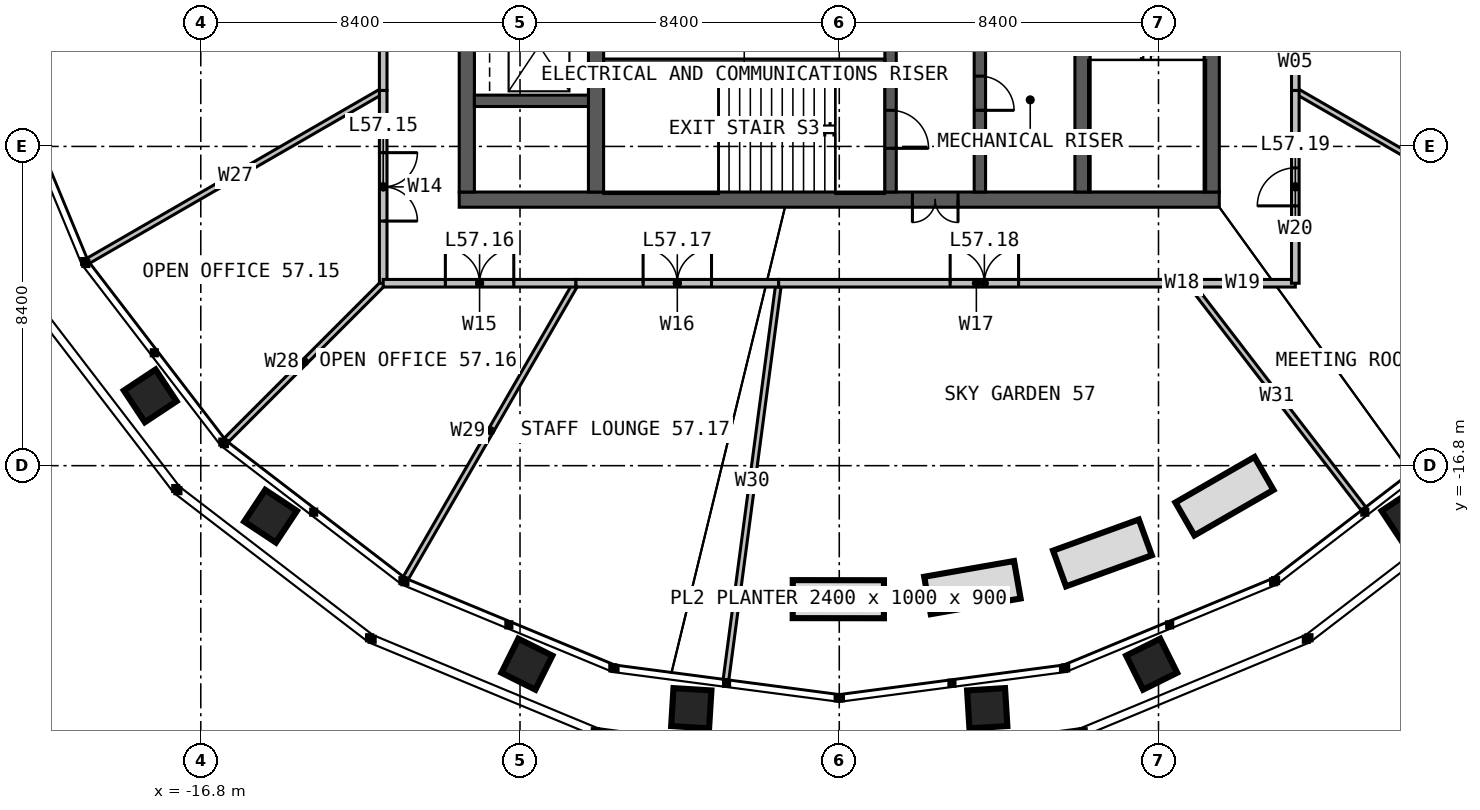
"""IFC4 building model, lengths in metres.
Left out: names, types, materials, properties, quantities, classifications, styles, units other than length and angle.
Written with IfcOpenShell. Run it as: python <this file> out.ifc"""

import sys

from ifc_helpers import new_model, si_unit, direction, frame, frame_2d, origin, place, context, subcontext, project, spatial, rectangle, extrude, element, fill, save


model = new_model("IFC4")
c1 = context("Model", 3, precision=1e-05, world=origin(), true_north=direction((0.0, 1.0)))
c2 = subcontext(c1, "Body", "Model", "MODEL_VIEW")
j1 = project(units=[si_unit("LENGTHUNIT", "METRE"), si_unit("PLANEANGLEUNIT", "RADIAN")], contexts=[c1])
p1 = place(None, origin())
s1 = spatial("IfcSite", under=j1, at=p1, CompositionType="ELEMENT")
p2 = place(p1, origin())
s2 = spatial("IfcBuilding", under=s1, at=p2, CompositionType="ELEMENT")
p3 = place(p2, frame((0.0, 0.0, 236.0)))
s3 = spatial("IfcBuildingStorey", under=s2, at=p3, CompositionType="ELEMENT", Elevation=236.0)
p4 = place(p3, frame((10.0, -9.8, 0.0), z_axis=(0.0, 0.0, 1.0), x_axis=(-1.0, 0.0, 0.0)))
e1 = element("IfcWall", 1, at=p4, inside=s3, PredefinedType="SOLIDWALL", context=c2, shape_type="SweptSolid", body=[
    extrude(rectangle(XDim=20.0, YDim=0.4, at=frame_2d((10.0, 0.0))), origin(), (0.0, 0.0, 1.0), 4.0),
])
p5 = place(p4, frame((6.875, 0.0, 0.0)))
e2 = element("IfcOpeningElement", 2, at=p5, cuts=e1, PredefinedType="OPENING", context=c2, shape_type="SweptSolid", body=[
    extrude(rectangle(XDim=1.2, YDim=2.2, at=frame_2d((0.6, 1.1))), frame((0.0, 0.21, 0.0), z_axis=(0.0, -1.0, 0.0), x_axis=(1.0, 0.0, 0.0)), (0.0, 0.0, 1.0), 0.42),
])
for number, where, z_axis, x_axis in (
    (3, (9.8, -9.6, 0.0), (0.0, 0.0, 1.0), (0.0, 1.0, 0.0)),
    (4, (-9.8, 9.6, 0.0), (0.0, 0.0, 1.0), (0.0, -1.0, 0.0)),
):
    element("IfcWall", number, at=place(p3, frame(where, z_axis=z_axis, x_axis=x_axis)), inside=s3, PredefinedType="SOLIDWALL", context=c2, shape_type="SweptSolid", body=[
        extrude(rectangle(XDim=19.2, YDim=0.4, at=frame_2d((9.6, 0.0))), origin(), (0.0, 0.0, 1.0), 4.0),
    ])
p6 = place(p3, frame((-6.4, -9.6, 0.0), z_axis=(0.0, 0.0, 1.0), x_axis=(0.0, 1.0, 0.0)))
e5 = element("IfcWall", 5, at=p6, inside=s3, PredefinedType="SOLIDWALL", context=c2, shape_type="SweptSolid", body=[
    extrude(rectangle(XDim=19.2, YDim=0.4, at=frame_2d((9.6, 0.0))), origin(), (0.0, 0.0, 1.0), 4.0),
])
p7 = place(p6, frame((9.1, 0.0, 0.0)))
e6 = element("IfcOpeningElement", 6, at=p7, cuts=e5, PredefinedType="OPENING", context=c2, shape_type="SweptSolid", body=[
    extrude(rectangle(XDim=1.0, YDim=2.2, at=frame_2d((0.5, 1.1))), frame((0.0, 0.21, 0.0), z_axis=(0.0, -1.0, 0.0), x_axis=(1.0, 0.0, 0.0)), (0.0, 0.0, 1.0), 0.42),
])
p8 = place(p3, frame((6.4, 9.6, 0.0), z_axis=(0.0, 0.0, 1.0), x_axis=(0.0, -1.0, 0.0)))
e7 = element("IfcWall", 7, at=p8, inside=s3, PredefinedType="SOLIDWALL", context=c2, shape_type="SweptSolid", body=[
    extrude(rectangle(XDim=19.2, YDim=0.4, at=frame_2d((9.6, 0.0))), origin(), (0.0, 0.0, 1.0), 4.0),
])
p9 = place(p8, frame((9.1, 0.0, 0.0)))
e8 = element("IfcOpeningElement", 8, at=p9, cuts=e7, PredefinedType="OPENING", context=c2, shape_type="SweptSolid", body=[
    extrude(rectangle(XDim=1.0, YDim=2.2, at=frame_2d((0.5, 1.1))), frame((0.0, 0.21, 0.0), z_axis=(0.0, -1.0, 0.0), x_axis=(1.0, 0.0, 0.0)), (0.0, 0.0, 1.0), 0.42),
])
p10 = place(p3, frame((1.35, -1.45, 0.0), z_axis=(0.0, 0.0, 1.0), x_axis=(0.0, -1.0, 0.0)))
e9 = element("IfcWall", 9, at=p10, inside=s3, PredefinedType="SOLIDWALL", context=c2, shape_type="SweptSolid", body=[
    extrude(rectangle(XDim=8.15, YDim=0.3, at=frame_2d((4.075, 0.0))), origin(), (0.0, 0.0, 1.0), 4.0),
])
p11 = place(p10, frame((6.0, 0.0, 0.0)))
e10 = element("IfcOpeningElement", 10, at=p11, cuts=e9, PredefinedType="OPENING", context=c2, shape_type="SweptSolid", body=[
    extrude(rectangle(XDim=1.0, YDim=2.2, at=frame_2d((0.5, 1.1))), frame((0.0, 0.16, 0.0), z_axis=(0.0, -1.0, 0.0), x_axis=(1.0, 0.0, 0.0)), (0.0, 0.0, 1.0), 0.32),
])
p12 = place(p10, frame((3.525, 0.0, 0.0)))
e11 = element("IfcOpeningElement", 11, at=p12, cuts=e9, PredefinedType="OPENING", context=c2, shape_type="SweptSolid", body=[
    extrude(rectangle(XDim=0.9, YDim=2.2, at=frame_2d((0.45, 1.1))), frame((0.0, 0.16, 0.0), z_axis=(0.0, -1.0, 0.0), x_axis=(1.0, 0.0, 0.0)), (0.0, 0.0, 1.0), 0.32),
])
p13 = place(p3, frame((3.7, -1.45, 0.0), z_axis=(0.0, 0.0, 1.0), x_axis=(0.0, -1.0, 0.0)))
e12 = element("IfcWall", 12, at=p13, inside=s3, PredefinedType="SOLIDWALL", context=c2, shape_type="SweptSolid", body=[
    extrude(rectangle(XDim=8.15, YDim=0.3, at=frame_2d((4.075, 0.0))), origin(), (0.0, 0.0, 1.0), 4.0),
])
p14 = place(p13, frame((5.1, 0.0, 0.0)))
e13 = element("IfcOpeningElement", 13, at=p14, cuts=e12, PredefinedType="OPENING", context=c2, shape_type="SweptSolid", body=[
    extrude(rectangle(XDim=0.9, YDim=2.2, at=frame_2d((0.45, 1.1))), frame((0.0, 0.16, 0.0), z_axis=(0.0, -1.0, 0.0), x_axis=(1.0, 0.0, 0.0)), (0.0, 0.0, 1.0), 0.32),
])
p15 = place(p3, frame((-6.2, -6.2, 0.0), z_axis=(0.0, 0.0, 1.0), x_axis=(1.0, 0.0, 0.0)))
e14 = element("IfcWall", 14, at=p15, inside=s3, PredefinedType="SOLIDWALL", context=c2, shape_type="SweptSolid", body=[
    extrude(rectangle(XDim=7.4, YDim=0.2, at=frame_2d((3.7, 0.0))), origin(), (0.0, 0.0, 1.0), 4.0),
])
p16 = place(p3, frame((-9.6, -7.2, 0.0), z_axis=(0.0, 0.0, 1.0), x_axis=(1.0, 0.0, 0.0)))
e15 = element("IfcWall", 15, at=p16, inside=s3, PredefinedType="SOLIDWALL", context=c2, shape_type="SweptSolid", body=[
    extrude(rectangle(XDim=3.0, YDim=0.3, at=frame_2d((1.5, 0.0))), origin(), (0.0, 0.0, 1.0), 4.0),
])
p17 = place(p3, frame((12.0, -6.928, 0.0), z_axis=(0.0, 0.0, 1.0), x_axis=(0.866025969295, -0.499999020506, 0.0)))
e16 = element("IfcWall", 16, at=p17, inside=s3, PredefinedType="PARTITIONING", context=c2, shape_type="SweptSolid", body=[
    extrude(rectangle(XDim=8.966, YDim=0.15, at=frame_2d((4.483, 0.0))), origin(), (0.0, 0.0, 1.0), 2.79),
])
p18 = place(p3, frame((12.0, -3.215, 0.0), z_axis=(0.0, 0.0, 1.0), x_axis=(0.965927197493, -0.258813927647, 0.0)))
e17 = element("IfcWall", 17, at=p18, inside=s3, PredefinedType="PARTITIONING", context=c2, shape_type="SweptSolid", body=[
    extrude(rectangle(XDim=10.399, YDim=0.15, at=frame_2d((5.199, 0.0))), origin(), (0.0, 0.0, 1.0), 2.79),
])
p19 = place(p3, frame((-12.0, -6.928, 0.0), z_axis=(0.0, 0.0, 1.0), x_axis=(-0.866025969295, -0.499999020506, 0.0)))
e18 = element("IfcWall", 18, at=p19, inside=s3, PredefinedType="PARTITIONING", context=c2, shape_type="SweptSolid", body=[
    extrude(rectangle(XDim=8.966, YDim=0.15, at=frame_2d((4.483, 0.0))), origin(), (0.0, 0.0, 1.0), 2.79),
])
p20 = place(p3, frame((-12.0, -12.0, 0.0), z_axis=(0.0, 0.0, 1.0), x_axis=(-0.707106781187, -0.707106781187, 0.0)))
e19 = element("IfcWall", 19, at=p20, inside=s3, PredefinedType="PARTITIONING", context=c2, shape_type="SweptSolid", body=[
    extrude(rectangle(XDim=5.852, YDim=0.15, at=frame_2d((2.926, 0.0))), origin(), (0.0, 0.0, 1.0), 2.79),
])
p21 = place(p3, frame((-6.928, -12.0, 0.0), z_axis=(0.0, 0.0, 1.0), x_axis=(-0.499999020506, -0.866025969295, 0.0)))
e20 = element("IfcWall", 20, at=p21, inside=s3, PredefinedType="PARTITIONING", context=c2, shape_type="SweptSolid", body=[
    extrude(rectangle(XDim=8.966, YDim=0.15, at=frame_2d((4.483, 0.0))), origin(), (0.0, 0.0, 1.0), 2.79),
])
p22 = place(p3, frame((-1.594, -12.0, 0.0), z_axis=(0.0, 0.0, 1.0), x_axis=(-0.131727497691, -0.991285965982, 0.0)))
e21 = element("IfcWall", 21, at=p22, inside=s3, PredefinedType="PARTITIONING", context=c2, shape_type="SweptSolid", body=[
    extrude(rectangle(XDim=10.522, YDim=0.15, at=frame_2d((5.261, 0.0))), origin(), (0.0, 0.0, 1.0), 2.79),
])
p23 = place(p3, frame((9.231, -12.0, 0.0), z_axis=(0.0, 0.0, 1.0), x_axis=(0.609721791475, -0.792615503886, 0.0)))
e22 = element("IfcWall", 22, at=p23, inside=s3, PredefinedType="PARTITIONING", context=c2, shape_type="SweptSolid", body=[
    extrude(rectangle(XDim=7.487, YDim=0.15, at=frame_2d((3.744, 0.0))), origin(), (0.0, 0.0, 1.0), 2.79),
])
p24 = place(p3, frame((12.0, -6.928, 0.0), z_axis=(0.0, 0.0, 1.0), x_axis=(0.0, 1.0, 0.0)))
e23 = element("IfcWall", 23, at=p24, inside=s3, PredefinedType="PARTITIONING", context=c2, shape_type="SweptSolid", body=[
    extrude(rectangle(XDim=3.713, YDim=0.2, at=frame_2d((1.856, 0.0))), origin(), (0.0, 0.0, 1.0), 3.8),
])
p25 = place(p24, frame((1.356, 0.0, 0.0)))
e24 = element("IfcOpeningElement", 24, at=p25, cuts=e23, PredefinedType="OPENING", context=c2, shape_type="SweptSolid", body=[
    extrude(rectangle(XDim=1.0, YDim=2.2, at=frame_2d((0.5, 1.1))), frame((0.0, 0.11, 0.0), z_axis=(0.0, -1.0, 0.0), x_axis=(1.0, 0.0, 0.0)), (0.0, 0.0, 1.0), 0.22),
])
p26 = place(p3, frame((-12.0, 6.928, 0.0), z_axis=(0.0, 0.0, 1.0), x_axis=(0.0, -1.0, 0.0)))
e25 = element("IfcWall", 25, at=p26, inside=s3, PredefinedType="PARTITIONING", context=c2, shape_type="SweptSolid", body=[
    extrude(rectangle(XDim=13.856, YDim=0.2, at=frame_2d((6.928, 0.0))), origin(), (0.0, 0.0, 1.0), 3.8),
])
p27 = place(p26, frame((6.028, 0.0, 0.0)))
e26 = element("IfcOpeningElement", 26, at=p27, cuts=e25, PredefinedType="OPENING", context=c2, shape_type="SweptSolid", body=[
    extrude(rectangle(XDim=1.8, YDim=2.2, at=frame_2d((0.9, 1.1))), frame((0.0, 0.11, 0.0), z_axis=(0.0, -1.0, 0.0), x_axis=(1.0, 0.0, 0.0)), (0.0, 0.0, 1.0), 0.22),
])
p28 = place(p3, frame((-12.0, -6.928, 0.0), z_axis=(0.0, 0.0, 1.0), x_axis=(0.0, -1.0, 0.0)))
e27 = element("IfcWall", 27, at=p28, inside=s3, PredefinedType="PARTITIONING", context=c2, shape_type="SweptSolid", body=[
    extrude(rectangle(XDim=5.072, YDim=0.2, at=frame_2d((2.536, 0.0))), origin(), (0.0, 0.0, 1.0), 3.8),
])
p29 = place(p28, frame((1.636, 0.0, 0.0)))
e28 = element("IfcOpeningElement", 28, at=p29, cuts=e27, PredefinedType="OPENING", context=c2, shape_type="SweptSolid", body=[
    extrude(rectangle(XDim=1.8, YDim=2.2, at=frame_2d((0.9, 1.1))), frame((0.0, 0.11, 0.0), z_axis=(0.0, -1.0, 0.0), x_axis=(1.0, 0.0, 0.0)), (0.0, 0.0, 1.0), 0.22),
])
p30 = place(p3, frame((-12.0, -12.0, 0.0), z_axis=(0.0, 0.0, 1.0), x_axis=(1.0, 0.0, 0.0)))
e29 = element("IfcWall", 29, at=p30, inside=s3, PredefinedType="PARTITIONING", context=c2, shape_type="SweptSolid", body=[
    extrude(rectangle(XDim=5.072, YDim=0.2, at=frame_2d((2.536, 0.0))), origin(), (0.0, 0.0, 1.0), 3.8),
])
p31 = place(p30, frame((1.636, 0.0, 0.0)))
e30 = element("IfcOpeningElement", 30, at=p31, cuts=e29, PredefinedType="OPENING", context=c2, shape_type="SweptSolid", body=[
    extrude(rectangle(XDim=1.8, YDim=2.2, at=frame_2d((0.9, 1.1))), frame((0.0, 0.11, 0.0), z_axis=(0.0, -1.0, 0.0), x_axis=(1.0, 0.0, 0.0)), (0.0, 0.0, 1.0), 0.22),
])
p32 = place(p3, frame((-6.928, -12.0, 0.0), z_axis=(0.0, 0.0, 1.0), x_axis=(1.0, 0.0, 0.0)))
e31 = element("IfcWall", 31, at=p32, inside=s3, PredefinedType="PARTITIONING", context=c2, shape_type="SweptSolid", body=[
    extrude(rectangle(XDim=5.334, YDim=0.2, at=frame_2d((2.667, 0.0))), origin(), (0.0, 0.0, 1.0), 3.8),
])
p33 = place(p32, frame((1.767, 0.0, 0.0)))
e32 = element("IfcOpeningElement", 32, at=p33, cuts=e31, PredefinedType="OPENING", context=c2, shape_type="SweptSolid", body=[
    extrude(rectangle(XDim=1.8, YDim=2.2, at=frame_2d((0.9, 1.1))), frame((0.0, 0.11, 0.0), z_axis=(0.0, -1.0, 0.0), x_axis=(1.0, 0.0, 0.0)), (0.0, 0.0, 1.0), 0.22),
])
p34 = place(p3, frame((-1.594, -12.0, 0.0), z_axis=(0.0, 0.0, 1.0), x_axis=(1.0, 0.0, 0.0)))
e33 = element("IfcWall", 33, at=p34, inside=s3, PredefinedType="PARTITIONING", context=c2, shape_type="SweptSolid", body=[
    extrude(rectangle(XDim=10.404, YDim=0.2, at=frame_2d((5.202, 0.0))), origin(), (0.0, 0.0, 1.0), 3.2),
])
p35 = place(p34, frame((4.513, 0.0, 0.0)))
e34 = element("IfcOpeningElement", 34, at=p35, cuts=e33, PredefinedType="OPENING", context=c2, shape_type="SweptSolid", body=[
    extrude(rectangle(XDim=1.8, YDim=2.2, at=frame_2d((0.9, 1.1))), frame((0.0, 0.11, 0.0), z_axis=(0.0, -1.0, 0.0), x_axis=(1.0, 0.0, 0.0)), (0.0, 0.0, 1.0), 0.22),
])
p36 = place(p3, frame((8.81, -12.0, 0.0), z_axis=(0.0, 0.0, 1.0), x_axis=(1.0, 0.0, 0.0)))
e35 = element("IfcWall", 35, at=p36, inside=s3, PredefinedType="PARTITIONING", context=c2, shape_type="SweptSolid", body=[
    extrude(rectangle(XDim=0.421, YDim=0.2, at=frame_2d((0.211, 0.0))), origin(), (0.0, 0.0, 1.0), 3.8),
])
p37 = place(p3, frame((9.231, -12.0, 0.0), z_axis=(0.0, 0.0, 1.0), x_axis=(1.0, 0.0, 0.0)))
e36 = element("IfcWall", 36, at=p37, inside=s3, PredefinedType="PARTITIONING", context=c2, shape_type="SweptSolid", body=[
    extrude(rectangle(XDim=2.769, YDim=0.2, at=frame_2d((1.385, 0.0))), origin(), (0.0, 0.0, 1.0), 3.8),
])
p38 = place(p3, frame((12.0, -12.0, 0.0), z_axis=(0.0, 0.0, 1.0), x_axis=(0.0, 1.0, 0.0)))
e37 = element("IfcWall", 37, at=p38, inside=s3, PredefinedType="PARTITIONING", context=c2, shape_type="SweptSolid", body=[
    extrude(rectangle(XDim=5.072, YDim=0.2, at=frame_2d((2.536, 0.0))), origin(), (0.0, 0.0, 1.0), 3.8),
])
p39 = place(p38, frame((2.036, 0.0, 0.0)))
e38 = element("IfcOpeningElement", 38, at=p39, cuts=e37, PredefinedType="OPENING", context=c2, shape_type="SweptSolid", body=[
    extrude(rectangle(XDim=1.0, YDim=2.2, at=frame_2d((0.5, 1.1))), frame((0.0, 0.11, 0.0), z_axis=(0.0, -1.0, 0.0), x_axis=(1.0, 0.0, 0.0)), (0.0, 0.0, 1.0), 0.22),
])
p40 = place(p5, origin())
e39 = element("IfcDoor", 39, at=p40, inside=s3, OperationType="DOUBLE_DOOR_SINGLE_SWING", PredefinedType="DOOR", context=c2, shape_type="SweptSolid", body=[
    extrude(rectangle(XDim=1.2, YDim=2.2, at=frame_2d((0.6, 1.1))), frame((0.0, 0.025, 0.0), z_axis=(0.0, -1.0, 0.0), x_axis=(1.0, 0.0, 0.0)), (0.0, 0.0, 1.0), 0.05),
])
fill(e2, e39)
p41 = place(p11, origin())
e40 = element("IfcDoor", 40, at=p41, inside=s3, OperationType="SINGLE_SWING_RIGHT", PredefinedType="DOOR", context=c2, shape_type="SweptSolid", body=[
    extrude(rectangle(XDim=1.0, YDim=2.2, at=frame_2d((0.5, 1.1))), frame((0.0, 0.025, 0.0), z_axis=(0.0, -1.0, 0.0), x_axis=(1.0, 0.0, 0.0)), (0.0, 0.0, 1.0), 0.05),
])
fill(e10, e40)
p42 = place(p14, origin())
e41 = element("IfcDoor", 41, at=p42, inside=s3, OperationType="SINGLE_SWING_RIGHT", PredefinedType="DOOR", context=c2, shape_type="SweptSolid", body=[
    extrude(rectangle(XDim=0.9, YDim=2.2, at=frame_2d((0.45, 1.1))), frame((0.0, 0.025, 0.0), z_axis=(0.0, -1.0, 0.0), x_axis=(1.0, 0.0, 0.0)), (0.0, 0.0, 1.0), 0.05),
])
fill(e13, e41)
p43 = place(p29, origin())
e42 = element("IfcDoor", 42, at=p43, inside=s3, OperationType="DOUBLE_DOOR_SINGLE_SWING", PredefinedType="DOOR", context=c2, shape_type="SweptSolid", body=[
    extrude(rectangle(XDim=1.8, YDim=2.2, at=frame_2d((0.9, 1.1))), frame((0.0, 0.025, 0.0), z_axis=(0.0, -1.0, 0.0), x_axis=(1.0, 0.0, 0.0)), (0.0, 0.0, 1.0), 0.05),
])
fill(e28, e42)
p44 = place(p31, origin())
e43 = element("IfcDoor", 43, at=p44, inside=s3, OperationType="DOUBLE_DOOR_SINGLE_SWING", PredefinedType="DOOR", context=c2, shape_type="SweptSolid", body=[
    extrude(rectangle(XDim=1.8, YDim=2.2, at=frame_2d((0.9, 1.1))), frame((0.0, 0.025, 0.0), z_axis=(0.0, -1.0, 0.0), x_axis=(1.0, 0.0, 0.0)), (0.0, 0.0, 1.0), 0.05),
])
fill(e30, e43)
p45 = place(p33, origin())
e44 = element("IfcDoor", 44, at=p45, inside=s3, OperationType="DOUBLE_DOOR_SINGLE_SWING", PredefinedType="DOOR", context=c2, shape_type="SweptSolid", body=[
    extrude(rectangle(XDim=1.8, YDim=2.2, at=frame_2d((0.9, 1.1))), frame((0.0, 0.025, 0.0), z_axis=(0.0, -1.0, 0.0), x_axis=(1.0, 0.0, 0.0)), (0.0, 0.0, 1.0), 0.05),
])
fill(e32, e44)
p46 = place(p35, origin())
e45 = element("IfcDoor", 45, at=p46, inside=s3, OperationType="DOUBLE_DOOR_SINGLE_SWING", PredefinedType="DOOR", context=c2, shape_type="SweptSolid", body=[
    extrude(rectangle(XDim=1.8, YDim=2.2, at=frame_2d((0.9, 1.1))), frame((0.0, 0.025, 0.0), z_axis=(0.0, -1.0, 0.0), x_axis=(1.0, 0.0, 0.0)), (0.0, 0.0, 1.0), 0.05),
])
fill(e34, e45)
p47 = place(p39, origin())
e46 = element("IfcDoor", 46, at=p47, inside=s3, OperationType="SINGLE_SWING_LEFT", PredefinedType="DOOR", context=c2, shape_type="SweptSolid", body=[
    extrude(rectangle(XDim=1.0, YDim=2.2, at=frame_2d((0.5, 1.1))), frame((0.0, 0.025, 0.0), z_axis=(0.0, -1.0, 0.0), x_axis=(1.0, 0.0, 0.0)), (0.0, 0.0, 1.0), 0.05),
])
fill(e38, e46)
save(model, sys.argv[1])
